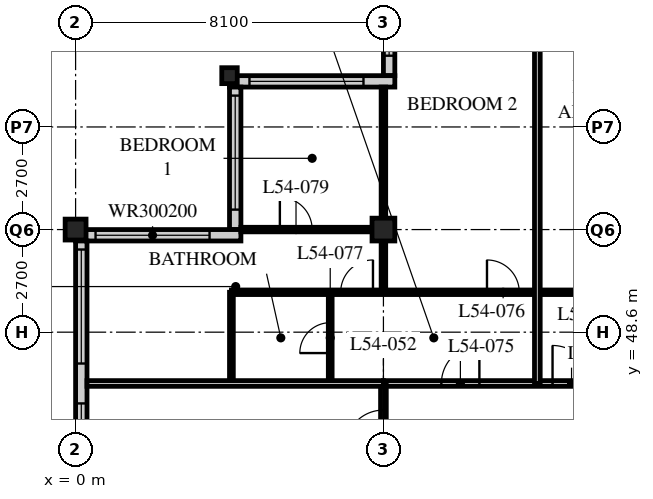
"""IFC4 building model, lengths in metres.
Left out: names, types, materials, properties, quantities, classifications, styles, units other than length and angle.
Written with IfcOpenShell. Run it as: python <this file> out.ifc"""

import sys

from ifc_helpers import new_model, si_unit, direction, frame, frame_2d, origin, origin_2d, place, context, subcontext, project, spatial, rectangle, hollow_rectangle, i_section, extrude, element, fill, save


model = new_model("IFC4")
c1 = context("Model", 3, precision=1e-05, world=origin(), true_north=direction((0.0, 1.0)))
c2 = subcontext(c1, "Body", "Model", "MODEL_VIEW")
j1 = project(units=[si_unit("LENGTHUNIT", "METRE"), si_unit("PLANEANGLEUNIT", "RADIAN")], contexts=[c1])
p1 = place(None, origin())
s1 = spatial("IfcSite", under=j1, at=p1, CompositionType="ELEMENT")
p2 = place(p1, origin())
s2 = spatial("IfcBuilding", under=s1, at=p2, CompositionType="ELEMENT")
p3 = place(p2, frame((0.0, 0.0, 210.0)))
s3 = spatial("IfcBuildingStorey", under=s2, at=p3, CompositionType="ELEMENT", Elevation=210.0)
p4 = place(p3, frame((0.0, 51.3, 0.0), z_axis=(0.0, 0.0, 1.0), x_axis=(1.0, 0.0, 0.0)))
e1 = element("IfcColumn", 1, at=p4, inside=s3, PredefinedType="COLUMN", context=c2, shape_type="SweptSolid", body=[
    extrude(hollow_rectangle(XDim=0.55, YDim=0.55, WallThickness=0.045, at=origin_2d()), origin(), (0.0, 0.0, 1.0), 3.6),
])
p5 = place(p3, frame((4.05, 55.35, 0.0), z_axis=(0.0, 0.0, 1.0), x_axis=(1.0, 0.0, 0.0)))
e2 = element("IfcColumn", 2, at=p5, inside=s3, PredefinedType="COLUMN", context=c2, shape_type="SweptSolid", body=[
    extrude(i_section(OverallWidth=0.407, OverallDepth=0.419, WebThickness=0.031, FlangeThickness=0.049, FilletRadius=0.015, at=origin_2d()), origin(), (0.0, 0.0, 1.0), 3.6),
])
p6 = place(p3, frame((8.1, 51.3, 0.0), z_axis=(0.0, 0.0, 1.0), x_axis=(1.0, 0.0, 0.0)))
e3 = element("IfcColumn", 3, at=p6, inside=s3, PredefinedType="COLUMN", context=c2, shape_type="SweptSolid", body=[
    extrude(hollow_rectangle(XDim=0.6, YDim=0.6, WallThickness=0.05, at=origin_2d()), origin(), (0.0, 0.0, 1.0), 3.6),
])
p7 = place(p3, frame((8.25, 59.1, 0.0), z_axis=(0.0, 0.0, 1.0), x_axis=(0.0, -1.0, 0.0)))
e4 = element("IfcWall", 4, at=p7, inside=s3, PredefinedType="SOLIDWALL", context=c2, shape_type="SweptSolid", body=[
    extrude(rectangle(XDim=3.75, YDim=0.3, at=frame_2d((1.875, 0.0))), origin(), (0.0, 0.0, 1.0), 3.39),
])
p8 = place(p7, frame((0.225, 0.0, 0.6)))
e5 = element("IfcOpeningElement", 5, at=p8, cuts=e4, PredefinedType="OPENING", context=c2, shape_type="SweptSolid", body=[
    extrude(rectangle(XDim=3.0, YDim=2.0, at=frame_2d((1.5, 1.0))), frame((0.0, 0.16, 0.0), z_axis=(0.0, -1.0, 0.0), x_axis=(1.0, 0.0, 0.0)), (0.0, 0.0, 1.0), 0.32),
])
p9 = place(p3, frame((8.4, 55.2, 0.0), z_axis=(0.0, 0.0, 1.0), x_axis=(-1.0, 0.0, 0.0)))
e6 = element("IfcWall", 6, at=p9, inside=s3, PredefinedType="SOLIDWALL", context=c2, shape_type="SweptSolid", body=[
    extrude(rectangle(XDim=4.35, YDim=0.3, at=frame_2d((2.175, 0.0))), origin(), (0.0, 0.0, 1.0), 3.39),
])
p10 = place(p9, frame((0.825, 0.0, 0.6)))
e7 = element("IfcOpeningElement", 7, at=p10, cuts=e6, PredefinedType="OPENING", context=c2, shape_type="SweptSolid", body=[
    extrude(rectangle(XDim=3.0, YDim=2.0, at=frame_2d((1.5, 1.0))), frame((0.0, 0.16, 0.0), z_axis=(0.0, -1.0, 0.0), x_axis=(1.0, 0.0, 0.0)), (0.0, 0.0, 1.0), 0.32),
])
p11 = place(p3, frame((4.2, 55.05, 0.0), z_axis=(0.0, 0.0, 1.0), x_axis=(0.0, -1.0, 0.0)))
e8 = element("IfcWall", 8, at=p11, inside=s3, PredefinedType="SOLIDWALL", context=c2, shape_type="SweptSolid", body=[
    extrude(rectangle(XDim=3.75, YDim=0.3, at=frame_2d((1.875, 0.0))), origin(), (0.0, 0.0, 1.0), 3.39),
])
p12 = place(p11, frame((0.225, 0.0, 0.6)))
e9 = element("IfcOpeningElement", 9, at=p12, cuts=e8, PredefinedType="OPENING", context=c2, shape_type="SweptSolid", body=[
    extrude(rectangle(XDim=3.0, YDim=2.0, at=frame_2d((1.5, 1.0))), frame((0.0, 0.16, 0.0), z_axis=(0.0, -1.0, 0.0), x_axis=(1.0, 0.0, 0.0)), (0.0, 0.0, 1.0), 0.32),
])
p13 = place(p3, frame((4.35, 51.15, 0.0), z_axis=(0.0, 0.0, 1.0), x_axis=(-1.0, 0.0, 0.0)))
e10 = element("IfcWall", 10, at=p13, inside=s3, PredefinedType="SOLIDWALL", context=c2, shape_type="SweptSolid", body=[
    extrude(rectangle(XDim=4.35, YDim=0.3, at=frame_2d((2.175, 0.0))), origin(), (0.0, 0.0, 1.0), 3.39),
])
p14 = place(p13, frame((0.825, 0.0, 0.6)))
e11 = element("IfcOpeningElement", 11, at=p14, cuts=e10, PredefinedType="OPENING", context=c2, shape_type="SweptSolid", body=[
    extrude(rectangle(XDim=3.0, YDim=2.0, at=frame_2d((1.5, 1.0))), frame((0.0, 0.16, 0.0), z_axis=(0.0, -1.0, 0.0), x_axis=(1.0, 0.0, 0.0)), (0.0, 0.0, 1.0), 0.32),
])
p15 = place(p3, frame((0.15, 51.0, 0.0), z_axis=(0.0, 0.0, 1.0), x_axis=(0.0, -1.0, 0.0)))
e12 = element("IfcWall", 12, at=p15, inside=s3, PredefinedType="SOLIDWALL", context=c2, shape_type="SweptSolid", body=[
    extrude(rectangle(XDim=32.1, YDim=0.3, at=frame_2d((16.05, 0.0))), origin(), (0.0, 0.0, 1.0), 3.39),
])
p16 = place(p15, frame((0.225, 0.0, 0.6)))
e13 = element("IfcOpeningElement", 13, at=p16, cuts=e12, PredefinedType="OPENING", context=c2, shape_type="SweptSolid", body=[
    extrude(rectangle(XDim=3.0, YDim=2.4, at=frame_2d((1.5, 1.2))), frame((0.0, 0.16, 0.0), z_axis=(0.0, -1.0, 0.0), x_axis=(1.0, 0.0, 0.0)), (0.0, 0.0, 1.0), 0.32),
])
p17 = place(p15, frame((4.275, 0.0, 0.6)))
e14 = element("IfcOpeningElement", 14, at=p17, cuts=e12, PredefinedType="OPENING", context=c2, shape_type="SweptSolid", body=[
    extrude(rectangle(XDim=3.0, YDim=2.4, at=frame_2d((1.5, 1.2))), frame((0.0, 0.16, 0.0), z_axis=(0.0, -1.0, 0.0), x_axis=(1.0, 0.0, 0.0)), (0.0, 0.0, 1.0), 0.32),
])
p18 = place(p15, frame((8.325, 0.0, 0.6)))
e15 = element("IfcOpeningElement", 15, at=p18, cuts=e12, PredefinedType="OPENING", context=c2, shape_type="SweptSolid", body=[
    extrude(rectangle(XDim=3.0, YDim=2.4, at=frame_2d((1.5, 1.2))), frame((0.0, 0.16, 0.0), z_axis=(0.0, -1.0, 0.0), x_axis=(1.0, 0.0, 0.0)), (0.0, 0.0, 1.0), 0.32),
])
p19 = place(p15, frame((12.375, 0.0, 0.6)))
e16 = element("IfcOpeningElement", 16, at=p19, cuts=e12, PredefinedType="OPENING", context=c2, shape_type="SweptSolid", body=[
    extrude(rectangle(XDim=3.0, YDim=2.4, at=frame_2d((1.5, 1.2))), frame((0.0, 0.16, 0.0), z_axis=(0.0, -1.0, 0.0), x_axis=(1.0, 0.0, 0.0)), (0.0, 0.0, 1.0), 0.32),
])
p20 = place(p15, frame((16.425, 0.0, 0.6)))
e17 = element("IfcOpeningElement", 17, at=p20, cuts=e12, PredefinedType="OPENING", context=c2, shape_type="SweptSolid", body=[
    extrude(rectangle(XDim=3.0, YDim=2.4, at=frame_2d((1.5, 1.2))), frame((0.0, 0.16, 0.0), z_axis=(0.0, -1.0, 0.0), x_axis=(1.0, 0.0, 0.0)), (0.0, 0.0, 1.0), 0.32),
])
p21 = place(p15, frame((20.475, 0.0, 0.6)))
e18 = element("IfcOpeningElement", 18, at=p21, cuts=e12, PredefinedType="OPENING", context=c2, shape_type="SweptSolid", body=[
    extrude(rectangle(XDim=3.0, YDim=2.4, at=frame_2d((1.5, 1.2))), frame((0.0, 0.16, 0.0), z_axis=(0.0, -1.0, 0.0), x_axis=(1.0, 0.0, 0.0)), (0.0, 0.0, 1.0), 0.32),
])
p22 = place(p15, frame((24.525, 0.0, 0.6)))
e19 = element("IfcOpeningElement", 19, at=p22, cuts=e12, PredefinedType="OPENING", context=c2, shape_type="SweptSolid", body=[
    extrude(rectangle(XDim=3.0, YDim=2.4, at=frame_2d((1.5, 1.2))), frame((0.0, 0.16, 0.0), z_axis=(0.0, -1.0, 0.0), x_axis=(1.0, 0.0, 0.0)), (0.0, 0.0, 1.0), 0.32),
])
p23 = place(p15, frame((28.575, 0.0, 0.6)))
e20 = element("IfcOpeningElement", 20, at=p23, cuts=e12, PredefinedType="OPENING", context=c2, shape_type="SweptSolid", body=[
    extrude(rectangle(XDim=3.0, YDim=2.4, at=frame_2d((1.5, 1.2))), frame((0.0, 0.16, 0.0), z_axis=(0.0, -1.0, 0.0), x_axis=(1.0, 0.0, 0.0)), (0.0, 0.0, 1.0), 0.32),
])
p24 = place(p3, frame((8.1, 47.25, 0.0), z_axis=(0.0, 0.0, 1.0), x_axis=(1.0, 0.0, 0.0)))
e21 = element("IfcWall", 21, at=p24, inside=s3, PredefinedType="PARTITIONING", context=c2, shape_type="SweptSolid", body=[
    extrude(rectangle(XDim=36.45, YDim=0.15, at=frame_2d((18.225, 0.0))), origin(), (0.0, 0.0, 1.0), 3.39),
])
p25 = place(p24, frame((4.45, 0.0, 0.0)))
e22 = element("IfcOpeningElement", 22, at=p25, cuts=e21, PredefinedType="OPENING", context=c2, shape_type="SweptSolid", body=[
    extrude(rectangle(XDim=1.0, YDim=2.1, at=frame_2d((0.5, 1.05))), frame((0.0, 0.085, 0.0), z_axis=(0.0, -1.0, 0.0), x_axis=(1.0, 0.0, 0.0)), (0.0, 0.0, 1.0), 0.17),
])
p26 = place(p24, frame((12.55, 0.0, 0.0)))
e23 = element("IfcOpeningElement", 23, at=p26, cuts=e21, PredefinedType="OPENING", context=c2, shape_type="SweptSolid", body=[
    extrude(rectangle(XDim=1.0, YDim=2.1, at=frame_2d((0.5, 1.05))), frame((0.0, 0.085, 0.0), z_axis=(0.0, -1.0, 0.0), x_axis=(1.0, 0.0, 0.0)), (0.0, 0.0, 1.0), 0.17),
])
p27 = place(p24, frame((30.7, 0.0, 0.0)))
e24 = element("IfcOpeningElement", 24, at=p27, cuts=e21, PredefinedType="OPENING", context=c2, shape_type="SweptSolid", body=[
    extrude(rectangle(XDim=1.0, YDim=2.1, at=frame_2d((0.5, 1.05))), frame((0.0, 0.085, 0.0), z_axis=(0.0, -1.0, 0.0), x_axis=(1.0, 0.0, 0.0)), (0.0, 0.0, 1.0), 0.17),
])
p28 = place(p24, frame((33.925, 0.0, 0.0)))
e25 = element("IfcOpeningElement", 25, at=p28, cuts=e21, PredefinedType="OPENING", context=c2, shape_type="SweptSolid", body=[
    extrude(rectangle(XDim=1.0, YDim=2.1, at=frame_2d((0.5, 1.05))), frame((0.0, 0.085, 0.0), z_axis=(0.0, -1.0, 0.0), x_axis=(1.0, 0.0, 0.0)), (0.0, 0.0, 1.0), 0.17),
])
p29 = place(p24, frame((1.525, 0.0, 0.0)))
e26 = element("IfcOpeningElement", 26, at=p29, cuts=e21, PredefinedType="OPENING", context=c2, shape_type="SweptSolid", body=[
    extrude(rectangle(XDim=1.0, YDim=2.1, at=frame_2d((0.5, 1.05))), frame((0.0, 0.085, 0.0), z_axis=(0.0, -1.0, 0.0), x_axis=(1.0, 0.0, 0.0)), (0.0, 0.0, 1.0), 0.17),
])
p30 = place(p3, frame((8.1, 18.9, 0.0), z_axis=(0.0, 0.0, 1.0), x_axis=(0.0, 1.0, 0.0)))
e27 = element("IfcWall", 27, at=p30, inside=s3, PredefinedType="PARTITIONING", context=c2, shape_type="SweptSolid", body=[
    extrude(rectangle(XDim=28.35, YDim=0.15, at=frame_2d((14.175, 0.0))), origin(), (0.0, 0.0, 1.0), 2.778),
])
p31 = place(p30, frame((0.9, 0.0, 0.0)))
e28 = element("IfcOpeningElement", 28, at=p31, cuts=e27, PredefinedType="OPENING", context=c2, shape_type="SweptSolid", body=[
    extrude(rectangle(XDim=1.0, YDim=2.1, at=frame_2d((0.5, 1.05))), frame((0.0, 0.085, 0.0), z_axis=(0.0, -1.0, 0.0), x_axis=(1.0, 0.0, 0.0)), (0.0, 0.0, 1.0), 0.17),
])
p32 = place(p30, frame((17.1, 0.0, 0.0)))
e29 = element("IfcOpeningElement", 29, at=p32, cuts=e27, PredefinedType="OPENING", context=c2, shape_type="SweptSolid", body=[
    extrude(rectangle(XDim=1.0, YDim=2.1, at=frame_2d((0.5, 1.05))), frame((0.0, 0.085, 0.0), z_axis=(0.0, -1.0, 0.0), x_axis=(1.0, 0.0, 0.0)), (0.0, 0.0, 1.0), 0.17),
])
p33 = place(p30, frame((26.65, 0.0, 0.0)))
e30 = element("IfcOpeningElement", 30, at=p33, cuts=e27, PredefinedType="OPENING", context=c2, shape_type="SweptSolid", body=[
    extrude(rectangle(XDim=1.0, YDim=2.1, at=frame_2d((0.5, 1.05))), frame((0.0, 0.085, 0.0), z_axis=(0.0, -1.0, 0.0), x_axis=(1.0, 0.0, 0.0)), (0.0, 0.0, 1.0), 0.17),
])
p34 = place(p3, frame((6.7, 47.25, 0.0), z_axis=(0.0, 0.0, 1.0), x_axis=(0.0, 1.0, 0.0)))
e31 = element("IfcWall", 31, at=p34, inside=s3, PredefinedType="PARTITIONING", context=c2, shape_type="SweptSolid", body=[
    extrude(rectangle(XDim=2.4, YDim=0.1, at=frame_2d((1.2, 0.0))), origin(), (0.0, 0.0, 1.0), 3.39),
])
p35 = place(p34, frame((0.8, 0.0, 0.0)))
e32 = element("IfcOpeningElement", 32, at=p35, cuts=e31, PredefinedType="OPENING", context=c2, shape_type="SweptSolid", body=[
    extrude(rectangle(XDim=0.8, YDim=2.1, at=frame_2d((0.4, 1.05))), frame((0.0, 0.06, 0.0), z_axis=(0.0, -1.0, 0.0), x_axis=(1.0, 0.0, 0.0)), (0.0, 0.0, 1.0), 0.12),
])
p36 = place(p3, frame((4.1, 47.25, 0.0), z_axis=(0.0, 0.0, 1.0), x_axis=(0.0, 1.0, 0.0)))
e33 = element("IfcWall", 33, at=p36, inside=s3, PredefinedType="PARTITIONING", context=c2, shape_type="SweptSolid", body=[
    extrude(rectangle(XDim=2.4, YDim=0.1, at=frame_2d((1.2, 0.0))), origin(), (0.0, 0.0, 1.0), 3.39),
])
p37 = place(p3, frame((4.1, 49.65, 0.0), z_axis=(0.0, 0.0, 1.0), x_axis=(1.0, 0.0, 0.0)))
e34 = element("IfcWall", 34, at=p37, inside=s3, PredefinedType="PARTITIONING", context=c2, shape_type="SweptSolid", body=[
    extrude(rectangle(XDim=32.35, YDim=0.12, at=frame_2d((16.175, 0.0))), origin(), (0.0, 0.0, 1.0), 3.39),
])
p38 = place(p37, frame((9.025, 0.0, 0.0)))
e35 = element("IfcOpeningElement", 35, at=p38, cuts=e34, PredefinedType="OPENING", context=c2, shape_type="SweptSolid", body=[
    extrude(rectangle(XDim=0.85, YDim=2.1, at=frame_2d((0.425, 1.05))), frame((0.0, 0.07, 0.0), z_axis=(0.0, -1.0, 0.0), x_axis=(1.0, 0.0, 0.0)), (0.0, 0.0, 1.0), 0.14),
])
p39 = place(p37, frame((12.425, 0.0, 0.0)))
e36 = element("IfcOpeningElement", 36, at=p39, cuts=e34, PredefinedType="OPENING", context=c2, shape_type="SweptSolid", body=[
    extrude(rectangle(XDim=0.85, YDim=2.1, at=frame_2d((0.425, 1.05))), frame((0.0, 0.07, 0.0), z_axis=(0.0, -1.0, 0.0), x_axis=(1.0, 0.0, 0.0)), (0.0, 0.0, 1.0), 0.14),
])
p40 = place(p37, frame((17.125, 0.0, 0.0)))
e37 = element("IfcOpeningElement", 37, at=p40, cuts=e34, PredefinedType="OPENING", context=c2, shape_type="SweptSolid", body=[
    extrude(rectangle(XDim=0.85, YDim=2.1, at=frame_2d((0.425, 1.05))), frame((0.0, 0.07, 0.0), z_axis=(0.0, -1.0, 0.0), x_axis=(1.0, 0.0, 0.0)), (0.0, 0.0, 1.0), 0.14),
])
p41 = place(p37, frame((24.575, 0.0, 0.0)))
e38 = element("IfcOpeningElement", 38, at=p41, cuts=e34, PredefinedType="OPENING", context=c2, shape_type="SweptSolid", body=[
    extrude(rectangle(XDim=0.85, YDim=2.1, at=frame_2d((0.425, 1.05))), frame((0.0, 0.07, 0.0), z_axis=(0.0, -1.0, 0.0), x_axis=(1.0, 0.0, 0.0)), (0.0, 0.0, 1.0), 0.14),
])
p42 = place(p37, frame((28.625, 0.0, 0.0)))
e39 = element("IfcOpeningElement", 39, at=p42, cuts=e34, PredefinedType="OPENING", context=c2, shape_type="SweptSolid", body=[
    extrude(rectangle(XDim=0.85, YDim=2.1, at=frame_2d((0.425, 1.05))), frame((0.0, 0.07, 0.0), z_axis=(0.0, -1.0, 0.0), x_axis=(1.0, 0.0, 0.0)), (0.0, 0.0, 1.0), 0.14),
])
p43 = place(p37, frame((6.725, 0.0, 0.0)))
e40 = element("IfcOpeningElement", 40, at=p43, cuts=e34, PredefinedType="OPENING", context=c2, shape_type="SweptSolid", body=[
    extrude(rectangle(XDim=0.85, YDim=2.1, at=frame_2d((0.425, 1.05))), frame((0.0, 0.07, 0.0), z_axis=(0.0, -1.0, 0.0), x_axis=(1.0, 0.0, 0.0)), (0.0, 0.0, 1.0), 0.14),
])
p44 = place(p37, frame((2.875, 0.0, 0.0)))
e41 = element("IfcOpeningElement", 41, at=p44, cuts=e34, PredefinedType="OPENING", context=c2, shape_type="SweptSolid", body=[
    extrude(rectangle(XDim=0.85, YDim=2.1, at=frame_2d((0.425, 1.05))), frame((0.0, 0.07, 0.0), z_axis=(0.0, -1.0, 0.0), x_axis=(1.0, 0.0, 0.0)), (0.0, 0.0, 1.0), 0.14),
])
p45 = place(p3, frame((8.1, 49.65, 0.0), z_axis=(0.0, 0.0, 1.0), x_axis=(0.0, 1.0, 0.0)))
e42 = element("IfcWall", 42, at=p45, inside=s3, PredefinedType="PARTITIONING", context=c2, shape_type="SweptSolid", body=[
    extrude(rectangle(XDim=5.4, YDim=0.12, at=frame_2d((2.7, 0.0))), origin(), (0.0, 0.0, 1.0), 2.778),
])
p46 = place(p3, frame((8.1, 51.3, 0.0), z_axis=(0.0, 0.0, 1.0), x_axis=(-1.0, 0.0, 0.0)))
e43 = element("IfcWall", 43, at=p46, inside=s3, PredefinedType="PARTITIONING", context=c2, shape_type="SweptSolid", body=[
    extrude(rectangle(XDim=3.75, YDim=0.12, at=frame_2d((1.875, 0.0))), origin(), (0.0, 0.0, 1.0), 2.778),
])
p47 = place(p46, frame((1.875, 0.0, 0.0)))
e44 = element("IfcOpeningElement", 44, at=p47, cuts=e43, PredefinedType="OPENING", context=c2, shape_type="SweptSolid", body=[
    extrude(rectangle(XDim=0.85, YDim=2.1, at=frame_2d((0.425, 1.05))), frame((0.0, 0.07, 0.0), z_axis=(0.0, -1.0, 0.0), x_axis=(1.0, 0.0, 0.0)), (0.0, 0.0, 1.0), 0.14),
])
p48 = place(p3, frame((0.3, 47.25, 0.0), z_axis=(0.0, 0.0, 1.0), x_axis=(1.0, 0.0, 0.0)))
e45 = element("IfcWall", 45, at=p48, inside=s3, PredefinedType="PARTITIONING", context=c2, shape_type="SweptSolid", body=[
    extrude(rectangle(XDim=7.8, YDim=0.15, at=frame_2d((3.9, 0.0))), origin(), (0.0, 0.0, 1.0), 3.39),
])
p49 = place(p3, frame((12.15, 47.25, 0.0), z_axis=(0.0, 0.0, 1.0), x_axis=(0.0, 1.0, 0.0)))
e46 = element("IfcWall", 46, at=p49, inside=s3, PredefinedType="PARTITIONING", context=c2, shape_type="SweptSolid", body=[
    extrude(rectangle(XDim=11.85, YDim=0.15, at=frame_2d((5.925, 0.0))), origin(), (0.0, 0.0, 1.0), 3.39),
])
p50 = place(p8, origin())
e47 = element("IfcWindow", 47, at=p50, inside=s3, PartitioningType="SINGLE_PANEL", PredefinedType="WINDOW", context=c2, shape_type="SweptSolid", body=[
    extrude(rectangle(XDim=3.0, YDim=2.0, at=frame_2d((1.5, 1.0))), frame((0.0, 0.03, 0.0), z_axis=(0.0, -1.0, 0.0), x_axis=(1.0, 0.0, 0.0)), (0.0, 0.0, 1.0), 0.06),
])
fill(e5, e47)
p51 = place(p10, origin())
e48 = element("IfcWindow", 48, at=p51, inside=s3, PartitioningType="SINGLE_PANEL", PredefinedType="WINDOW", context=c2, shape_type="SweptSolid", body=[
    extrude(rectangle(XDim=3.0, YDim=2.0, at=frame_2d((1.5, 1.0))), frame((0.0, 0.03, 0.0), z_axis=(0.0, -1.0, 0.0), x_axis=(1.0, 0.0, 0.0)), (0.0, 0.0, 1.0), 0.06),
])
fill(e7, e48)
p52 = place(p12, origin())
e49 = element("IfcWindow", 49, at=p52, inside=s3, PartitioningType="SINGLE_PANEL", PredefinedType="WINDOW", context=c2, shape_type="SweptSolid", body=[
    extrude(rectangle(XDim=3.0, YDim=2.0, at=frame_2d((1.5, 1.0))), frame((0.0, 0.03, 0.0), z_axis=(0.0, -1.0, 0.0), x_axis=(1.0, 0.0, 0.0)), (0.0, 0.0, 1.0), 0.06),
])
fill(e9, e49)
p53 = place(p14, origin())
e50 = element("IfcWindow", 50, at=p53, inside=s3, PartitioningType="SINGLE_PANEL", PredefinedType="WINDOW", context=c2, shape_type="SweptSolid", body=[
    extrude(rectangle(XDim=3.0, YDim=2.0, at=frame_2d((1.5, 1.0))), frame((0.0, 0.03, 0.0), z_axis=(0.0, -1.0, 0.0), x_axis=(1.0, 0.0, 0.0)), (0.0, 0.0, 1.0), 0.06),
])
fill(e11, e50)
p54 = place(p16, origin())
e51 = element("IfcWindow", 51, at=p54, inside=s3, PartitioningType="SINGLE_PANEL", PredefinedType="WINDOW", context=c2, shape_type="SweptSolid", body=[
    extrude(rectangle(XDim=3.0, YDim=2.4, at=frame_2d((1.5, 1.2))), frame((0.0, 0.03, 0.0), z_axis=(0.0, -1.0, 0.0), x_axis=(1.0, 0.0, 0.0)), (0.0, 0.0, 1.0), 0.06),
])
fill(e13, e51)
p55 = place(p17, origin())
e52 = element("IfcWindow", 52, at=p55, inside=s3, PartitioningType="SINGLE_PANEL", PredefinedType="WINDOW", context=c2, shape_type="SweptSolid", body=[
    extrude(rectangle(XDim=3.0, YDim=2.4, at=frame_2d((1.5, 1.2))), frame((0.0, 0.03, 0.0), z_axis=(0.0, -1.0, 0.0), x_axis=(1.0, 0.0, 0.0)), (0.0, 0.0, 1.0), 0.06),
])
fill(e14, e52)
p56 = place(p25, origin())
e53 = element("IfcDoor", 53, at=p56, inside=s3, OperationType="SINGLE_SWING_LEFT", PredefinedType="DOOR", context=c2, shape_type="SweptSolid", body=[
    extrude(rectangle(XDim=1.0, YDim=2.1, at=frame_2d((0.5, 1.05))), frame((0.0, 0.025, 0.0), z_axis=(0.0, -1.0, 0.0), x_axis=(1.0, 0.0, 0.0)), (0.0, 0.0, 1.0), 0.05),
])
fill(e22, e53)
p57 = place(p33, origin())
e54 = element("IfcDoor", 54, at=p57, inside=s3, OperationType="SINGLE_SWING_LEFT", PredefinedType="DOOR", context=c2, shape_type="SweptSolid", body=[
    extrude(rectangle(XDim=1.0, YDim=2.1, at=frame_2d((0.5, 1.05))), frame((0.0, 0.025, 0.0), z_axis=(0.0, -1.0, 0.0), x_axis=(1.0, 0.0, 0.0)), (0.0, 0.0, 1.0), 0.05),
])
fill(e30, e54)
p58 = place(p29, origin())
e55 = element("IfcDoor", 55, at=p58, inside=s3, OperationType="SINGLE_SWING_RIGHT", PredefinedType="DOOR", context=c2, shape_type="SweptSolid", body=[
    extrude(rectangle(XDim=1.0, YDim=2.1, at=frame_2d((0.5, 1.05))), frame((0.0, 0.025, 0.0), z_axis=(0.0, -1.0, 0.0), x_axis=(1.0, 0.0, 0.0)), (0.0, 0.0, 1.0), 0.05),
])
fill(e26, e55)
p59 = place(p43, origin())
e56 = element("IfcDoor", 56, at=p59, inside=s3, OperationType="SINGLE_SWING_LEFT", PredefinedType="DOOR", context=c2, shape_type="SweptSolid", body=[
    extrude(rectangle(XDim=0.85, YDim=2.1, at=frame_2d((0.425, 1.05))), frame((0.0, 0.025, 0.0), z_axis=(0.0, -1.0, 0.0), x_axis=(1.0, 0.0, 0.0)), (0.0, 0.0, 1.0), 0.05),
])
fill(e40, e56)
p60 = place(p35, origin())
e57 = element("IfcDoor", 57, at=p60, inside=s3, OperationType="SINGLE_SWING_LEFT", PredefinedType="DOOR", context=c2, shape_type="SweptSolid", body=[
    extrude(rectangle(XDim=0.8, YDim=2.1, at=frame_2d((0.4, 1.05))), frame((0.0, 0.025, 0.0), z_axis=(0.0, -1.0, 0.0), x_axis=(1.0, 0.0, 0.0)), (0.0, 0.0, 1.0), 0.05),
])
fill(e32, e57)
p61 = place(p44, origin())
e58 = element("IfcDoor", 58, at=p61, inside=s3, OperationType="SINGLE_SWING_RIGHT", PredefinedType="DOOR", context=c2, shape_type="SweptSolid", body=[
    extrude(rectangle(XDim=0.85, YDim=2.1, at=frame_2d((0.425, 1.05))), frame((0.0, 0.025, 0.0), z_axis=(0.0, -1.0, 0.0), x_axis=(1.0, 0.0, 0.0)), (0.0, 0.0, 1.0), 0.05),
])
fill(e41, e58)
p62 = place(p47, origin())
e59 = element("IfcDoor", 59, at=p62, inside=s3, OperationType="SINGLE_SWING_LEFT", PredefinedType="DOOR", context=c2, shape_type="SweptSolid", body=[
    extrude(rectangle(XDim=0.85, YDim=2.1, at=frame_2d((0.425, 1.05))), frame((0.0, 0.025, 0.0), z_axis=(0.0, -1.0, 0.0), x_axis=(1.0, 0.0, 0.0)), (0.0, 0.0, 1.0), 0.05),
])
fill(e44, e59)
save(model, sys.argv[1])
